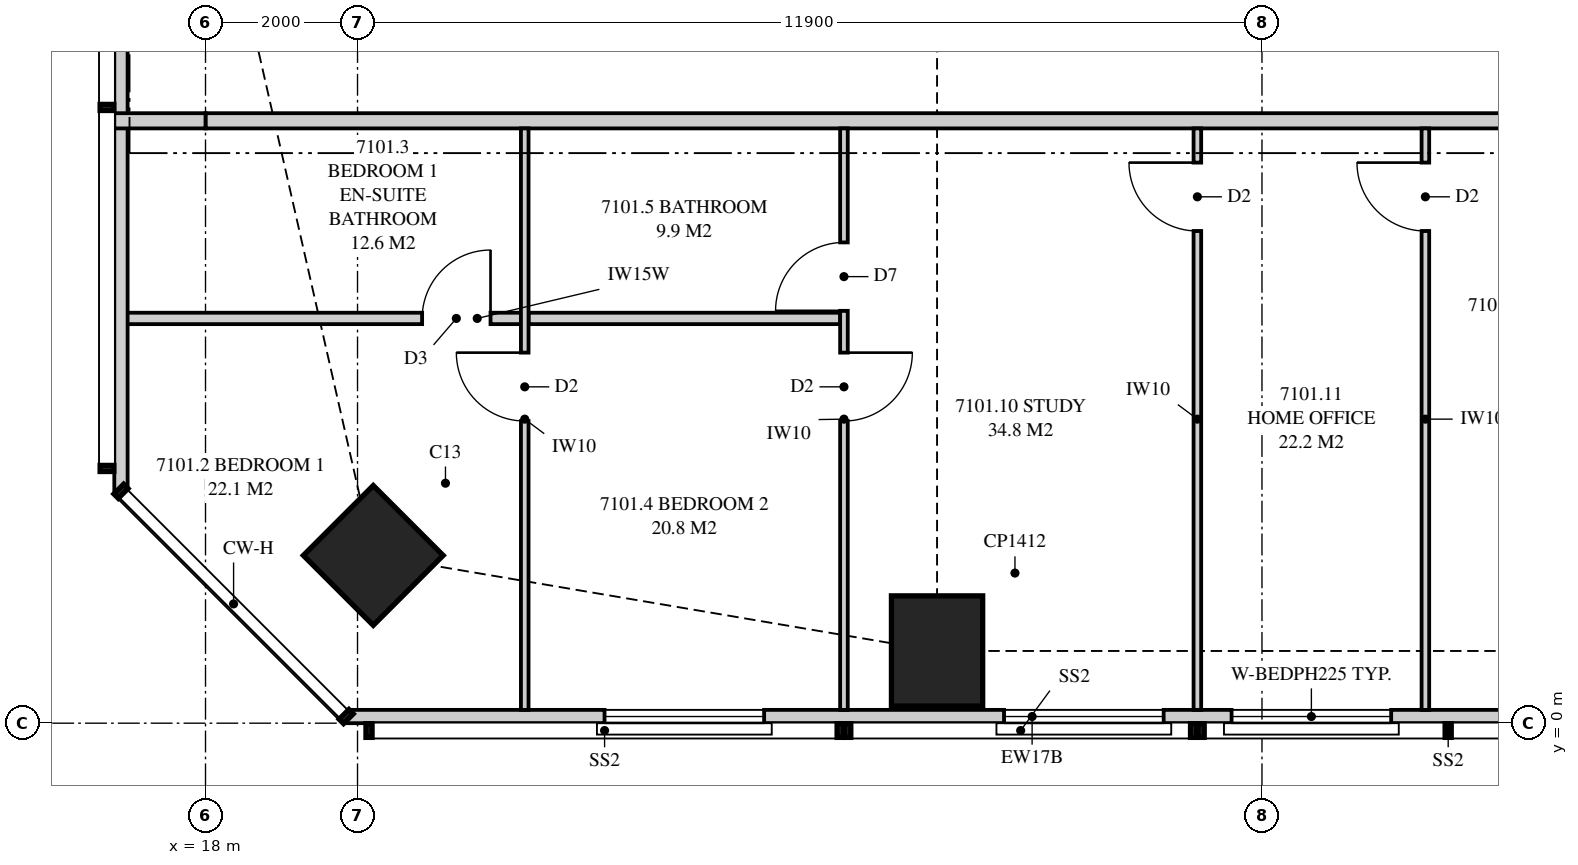
"""IFC4 building model, lengths in metres.
Left out: names, types, materials, properties, quantities, classifications, styles, units other than length and angle.
Written with IfcOpenShell. Run it as: python <this file> out.ifc"""

import sys

from ifc_helpers import new_model, si_unit, direction, frame, frame_2d, origin, origin_2d, place, context, subcontext, project, spatial, polyline, rectangle, outline, extrude, element, fill, save


model = new_model("IFC4")
c1 = context("Model", 3, precision=1e-05, world=origin(), true_north=direction((0.0, 1.0)))
c2 = subcontext(c1, "Body", "Model", "MODEL_VIEW")
j1 = project(units=[si_unit("LENGTHUNIT", "METRE"), si_unit("PLANEANGLEUNIT", "RADIAN")], contexts=[c1])
p1 = place(None, origin())
s1 = spatial("IfcSite", under=j1, at=p1, CompositionType="ELEMENT")
p2 = place(p1, origin())
s2 = spatial("IfcBuilding", under=s1, at=p2, CompositionType="ELEMENT")
p3 = place(p2, frame((0.0, 0.0, 259.95)))
s3 = spatial("IfcBuildingStorey", under=s2, at=p3, CompositionType="ELEMENT", Elevation=259.95)
p4 = place(p3, frame((20.207, 2.207, 0.0), z_axis=(0.0, 0.0, 1.0), x_axis=(0.707106781187, 0.707106781187, 0.0)))
e1 = element("IfcColumn", 1, at=p4, inside=s3, PredefinedType="COLUMN", context=c2, shape_type="SweptSolid", body=[
    extrude(rectangle(XDim=1.3, YDim=1.3, at=origin_2d()), origin(), (0.0, 0.0, 1.0), 3.9),
])
p5 = place(p3, frame((27.625, 0.95, 0.0), z_axis=(0.0, 0.0, 1.0), x_axis=(0.0, 1.0, 0.0)))
e2 = element("IfcColumn", 2, at=p5, inside=s3, PredefinedType="COLUMN", context=c2, shape_type="SweptSolid", body=[
    extrude(rectangle(XDim=1.45, YDim=1.2, at=origin_2d()), origin(), (0.0, 0.0, 1.0), 3.9),
])
p6 = place(p3, frame((19.851, 0.087, 0.0), z_axis=(0.0, 0.0, 1.0), x_axis=(1.0, 0.0, 0.0)))
e3 = element("IfcWall", 3, at=p6, inside=s3, PredefinedType="SOLIDWALL", context=c2, shape_type="SweptSolid", body=[
    extrude(outline(polyline([(0.0, 0.0), (18.049, 0.0), (18.049, 2.7), (7.774, 2.7), (7.774, 3.66), (7.642, 3.66), (7.642, 2.7), (7.559, 2.7), (7.559, 3.66), (0.0, 3.66), (0.0, 0.0)])), frame((0.0, 0.087, 0.0), z_axis=(0.0, -1.0, 0.0), x_axis=(1.0, 0.0, 0.0)), (0.0, 0.0, 1.0), 0.175),
])
p7 = place(p6, frame((3.399, 0.0, 0.4)))
e4 = element("IfcOpeningElement", 4, at=p7, cuts=e3, PredefinedType="OPENING", context=c2, shape_type="SweptSolid", body=[
    extrude(rectangle(XDim=2.1, YDim=2.25, at=frame_2d((1.05, 1.125))), frame((0.0, 0.097, 0.0), z_axis=(0.0, -1.0, 0.0), x_axis=(1.0, 0.0, 0.0)), (0.0, 0.0, 1.0), 0.195),
])
p8 = place(p6, frame((8.655, 0.0, 0.4)))
e5 = element("IfcOpeningElement", 5, at=p8, cuts=e3, PredefinedType="OPENING", context=c2, shape_type="SweptSolid", body=[
    extrude(rectangle(XDim=2.1, YDim=2.25, at=frame_2d((1.05, 1.125))), frame((0.0, 0.097, 0.0), z_axis=(0.0, -1.0, 0.0), x_axis=(1.0, 0.0, 0.0)), (0.0, 0.0, 1.0), 0.195),
])
p9 = place(p6, frame((11.649, 0.0, 0.4)))
e6 = element("IfcOpeningElement", 6, at=p9, cuts=e3, PredefinedType="OPENING", context=c2, shape_type="SweptSolid", body=[
    extrude(rectangle(XDim=2.1, YDim=2.25, at=frame_2d((1.05, 1.125))), frame((0.0, 0.097, 0.0), z_axis=(0.0, -1.0, 0.0), x_axis=(1.0, 0.0, 0.0)), (0.0, 0.0, 1.0), 0.195),
])
p10 = place(p3, frame((16.887, 30.949, 0.0), z_axis=(0.0, 0.0, 1.0), x_axis=(0.0, -1.0, 0.0)))
e7 = element("IfcWall", 7, at=p10, inside=s3, PredefinedType="SOLIDWALL", context=c2, shape_type="SweptSolid", body=[
    extrude(outline(polyline([(0.0, 0.0), (27.897, 0.0), (27.897, 3.66), (18.148, 3.66), (18.148, 2.7), (18.125, 2.7), (18.125, 3.66), (17.949, 3.66), (17.949, 2.7), (5.949, 2.7), (5.949, 3.66), (0.0, 3.66), (0.0, 0.0)])), frame((0.0, 0.087, 0.0), z_axis=(0.0, -1.0, 0.0), x_axis=(1.0, 0.0, 0.0)), (0.0, 0.0, 1.0), 0.175),
])
p11 = place(p10, frame((11.849, 0.0, 0.4)))
e8 = element("IfcOpeningElement", 8, at=p11, cuts=e7, PredefinedType="OPENING", context=c2, shape_type="SweptSolid", body=[
    extrude(rectangle(XDim=1.2, YDim=2.0, at=frame_2d((0.6, 1.0))), frame((0.0, 0.097, 0.0), z_axis=(0.0, -1.0, 0.0), x_axis=(1.0, 0.0, 0.0)), (0.0, 0.0, 1.0), 0.195),
])
p12 = place(p3, frame((18.0, 7.925, 0.0), z_axis=(0.0, 0.0, 1.0), x_axis=(1.0, 0.0, 0.0)))
e9 = element("IfcWall", 9, at=p12, inside=s3, PredefinedType="PARTITIONING", context=c2, shape_type="SweptSolid", body=[
    extrude(outline(polyline([(0.0, 0.0), (27.875, 0.0), (27.875, 3.66), (27.875, 3.06), (27.565, 3.06), (27.565, 3.66), (20.56, 3.66), (20.56, 3.06), (17.94, 3.06), (17.94, 3.66), (10.935, 3.66), (10.935, 3.06), (8.315, 3.06), (8.315, 3.66), (1.839, 3.66), (1.839, 2.7), (0.0, 2.7), (0.0, 3.66), (0.0, 0.0)])), frame((0.0, 0.1, 0.0), z_axis=(0.0, -1.0, 0.0), x_axis=(1.0, 0.0, 0.0)), (0.0, 0.0, 1.0), 0.2),
])
p13 = place(p12, frame((18.75, 0.0, 0.0)))
e10 = element("IfcOpeningElement", 10, at=p13, cuts=e9, PredefinedType="OPENING", context=c2, shape_type="SweptSolid", body=[
    extrude(rectangle(XDim=1.05, YDim=2.2, at=frame_2d((0.525, 1.1))), frame((0.0, 0.11, 0.0), z_axis=(0.0, -1.0, 0.0), x_axis=(1.0, 0.0, 0.0)), (0.0, 0.0, 1.0), 0.22),
])
p14 = place(p3, frame((22.2, 0.175, 0.0), z_axis=(0.0, 0.0, 1.0), x_axis=(0.0, 1.0, 0.0)))
e11 = element("IfcWall", 11, at=p14, inside=s3, PredefinedType="PARTITIONING", context=c2, shape_type="SweptSolid", body=[
    extrude(outline(polyline([(0.0, 0.0), (7.65, 0.0), (7.65, 3.66), (2.567, 3.66), (2.567, 2.7), (0.822, 2.7), (0.822, 3.66), (0.0, 3.66), (0.0, 0.0)])), frame((0.0, 0.05, 0.0), z_axis=(0.0, -1.0, 0.0), x_axis=(1.0, 0.0, 0.0)), (0.0, 0.0, 1.0), 0.1),
])
p15 = place(p14, frame((3.8, 0.0, 0.0)))
e12 = element("IfcOpeningElement", 12, at=p15, cuts=e11, PredefinedType="OPENING", context=c2, shape_type="SweptSolid", body=[
    extrude(rectangle(XDim=0.9, YDim=2.1, at=frame_2d((0.45, 1.05))), frame((0.0, 0.06, 0.0), z_axis=(0.0, -1.0, 0.0), x_axis=(1.0, 0.0, 0.0)), (0.0, 0.0, 1.0), 0.12),
])
p16 = place(p3, frame((26.4, 0.175, 0.0), z_axis=(0.0, 0.0, 1.0), x_axis=(0.0, 1.0, 0.0)))
e13 = element("IfcWall", 13, at=p16, inside=s3, PredefinedType="PARTITIONING", context=c2, shape_type="SweptSolid", body=[
    extrude(outline(polyline([(0.0, 0.0), (7.65, 0.0), (7.65, 3.66), (7.65, 3.06), (1.855, 3.06), (1.855, 2.7), (0.11, 2.7), (0.11, 3.66), (0.0, 3.66), (0.0, 0.0)])), frame((0.0, 0.05, 0.0), z_axis=(0.0, -1.0, 0.0), x_axis=(1.0, 0.0, 0.0)), (0.0, 0.0, 1.0), 0.1),
])
p17 = place(p16, frame((3.8, 0.0, 0.0)))
e14 = element("IfcOpeningElement", 14, at=p17, cuts=e13, PredefinedType="OPENING", context=c2, shape_type="SweptSolid", body=[
    extrude(rectangle(XDim=0.9, YDim=2.1, at=frame_2d((0.45, 1.05))), frame((0.0, 0.06, 0.0), z_axis=(0.0, -1.0, 0.0), x_axis=(1.0, 0.0, 0.0)), (0.0, 0.0, 1.0), 0.12),
])
p18 = place(p16, frame((5.25, 0.0, 0.0)))
e15 = element("IfcOpeningElement", 15, at=p18, cuts=e13, PredefinedType="OPENING", context=c2, shape_type="SweptSolid", body=[
    extrude(rectangle(XDim=0.9, YDim=2.1, at=frame_2d((0.45, 1.05))), frame((0.0, 0.06, 0.0), z_axis=(0.0, -1.0, 0.0), x_axis=(1.0, 0.0, 0.0)), (0.0, 0.0, 1.0), 0.12),
])
p19 = place(p3, frame((16.8, 5.325, 0.0), z_axis=(0.0, 0.0, 1.0), x_axis=(1.0, 0.0, 0.0)))
e16 = element("IfcWall", 16, at=p19, inside=s3, PredefinedType="PLUMBINGWALL", context=c2, shape_type="SweptSolid", body=[
    extrude(outline(polyline([(0.0, 0.0), (5.35, 0.0), (5.35, 3.66), (3.605, 3.66), (3.605, 2.7), (1.79, 2.7), (1.79, 3.66), (0.0, 3.66), (0.0, 0.0)])), frame((0.0, 0.075, 0.0), z_axis=(0.0, -1.0, 0.0), x_axis=(1.0, 0.0, 0.0)), (0.0, 0.0, 1.0), 0.15),
])
p20 = place(p19, frame((4.05, 0.0, 0.0)))
e17 = element("IfcOpeningElement", 17, at=p20, cuts=e16, PredefinedType="OPENING", context=c2, shape_type="SweptSolid", body=[
    extrude(rectangle(XDim=0.9, YDim=2.1, at=frame_2d((0.45, 1.05))), frame((0.0, 0.085, 0.0), z_axis=(0.0, -1.0, 0.0), x_axis=(1.0, 0.0, 0.0)), (0.0, 0.0, 1.0), 0.17),
])
p21 = place(p3, frame((22.25, 5.325, 0.0), z_axis=(0.0, 0.0, 1.0), x_axis=(1.0, 0.0, 0.0)))
e18 = element("IfcWall", 18, at=p21, inside=s3, PredefinedType="PLUMBINGWALL", context=c2, shape_type="SweptSolid", body=[
    extrude(outline(polyline([(0.0, 0.0), (4.1, 0.0), (4.1, 3.66), (4.1, 3.06), (4.09, 3.06), (4.09, 3.66), (0.0, 3.66), (0.0, 0.0)])), frame((0.0, 0.075, 0.0), z_axis=(0.0, -1.0, 0.0), x_axis=(1.0, 0.0, 0.0)), (0.0, 0.0, 1.0), 0.15),
])
p22 = place(p3, frame((31.05, 0.175, 0.0), z_axis=(0.0, 0.0, 1.0), x_axis=(0.0, 1.0, 0.0)))
e19 = element("IfcWall", 19, at=p22, inside=s3, PredefinedType="PARTITIONING", context=c2, shape_type="SweptSolid", body=[
    extrude(outline(polyline([(0.0, 0.0), (7.65, 0.0), (7.65, 3.66), (1.635, 3.66), (1.635, 2.7), (0.0, 2.7), (0.0, 3.66), (0.0, 0.0)])), frame((0.0, 0.05, 0.0), z_axis=(0.0, -1.0, 0.0), x_axis=(1.0, 0.0, 0.0)), (0.0, 0.0, 1.0), 0.1),
])
p23 = place(p22, frame((6.3, 0.0, 0.0)))
e20 = element("IfcOpeningElement", 20, at=p23, cuts=e19, PredefinedType="OPENING", context=c2, shape_type="SweptSolid", body=[
    extrude(rectangle(XDim=0.9, YDim=2.1, at=frame_2d((0.45, 1.05))), frame((0.0, 0.06, 0.0), z_axis=(0.0, -1.0, 0.0), x_axis=(1.0, 0.0, 0.0)), (0.0, 0.0, 1.0), 0.12),
])
p24 = place(p3, frame((34.05, 0.175, 0.0), z_axis=(0.0, 0.0, 1.0), x_axis=(0.0, 1.0, 0.0)))
e21 = element("IfcWall", 21, at=p24, inside=s3, PredefinedType="PARTITIONING", context=c2, shape_type="SweptSolid", body=[
    extrude(outline(polyline([(0.0, 0.0), (7.65, 0.0), (7.65, 3.66), (1.635, 3.66), (1.635, 2.7), (0.0, 2.7), (0.0, 3.66), (0.0, 0.0)])), frame((0.0, 0.05, 0.0), z_axis=(0.0, -1.0, 0.0), x_axis=(1.0, 0.0, 0.0)), (0.0, 0.0, 1.0), 0.1),
])
p25 = place(p24, frame((6.3, 0.0, 0.0)))
e22 = element("IfcOpeningElement", 22, at=p25, cuts=e21, PredefinedType="OPENING", context=c2, shape_type="SweptSolid", body=[
    extrude(rectangle(XDim=0.9, YDim=2.1, at=frame_2d((0.45, 1.05))), frame((0.0, 0.06, 0.0), z_axis=(0.0, -1.0, 0.0), x_axis=(1.0, 0.0, 0.0)), (0.0, 0.0, 1.0), 0.12),
])
p26 = place(p3, frame((16.8, 7.925, 0.0), z_axis=(0.0, 0.0, 1.0), x_axis=(1.0, 0.0, 0.0)))
e23 = element("IfcWall", 23, at=p26, inside=s3, PredefinedType="PARTITIONING", context=c2, shape_type="SweptSolid", body=[
    extrude(outline(polyline([(0.0, 0.0), (1.2, 0.0), (1.2, 3.66), (1.2, 2.7), (1.172, 2.7), (1.172, 3.66), (0.0, 3.66), (0.0, 0.0)])), frame((0.0, 0.1, 0.0), z_axis=(0.0, -1.0, 0.0), x_axis=(1.0, 0.0, 0.0)), (0.0, 0.0, 1.0), 0.2),
])
p27 = place(p7, origin())
e24 = element("IfcWindow", 24, at=p27, inside=s3, PartitioningType="SINGLE_PANEL", PredefinedType="WINDOW", context=c2, shape_type="SweptSolid", body=[
    extrude(rectangle(XDim=2.1, YDim=2.25, at=frame_2d((1.05, 1.125))), frame((0.0, 0.03, 0.0), z_axis=(0.0, -1.0, 0.0), x_axis=(1.0, 0.0, 0.0)), (0.0, 0.0, 1.0), 0.06),
])
fill(e4, e24)
p28 = place(p8, origin())
e25 = element("IfcWindow", 25, at=p28, inside=s3, PartitioningType="SINGLE_PANEL", PredefinedType="WINDOW", context=c2, shape_type="SweptSolid", body=[
    extrude(rectangle(XDim=2.1, YDim=2.25, at=frame_2d((1.05, 1.125))), frame((0.0, 0.03, 0.0), z_axis=(0.0, -1.0, 0.0), x_axis=(1.0, 0.0, 0.0)), (0.0, 0.0, 1.0), 0.06),
])
fill(e5, e25)
p29 = place(p9, origin())
e26 = element("IfcWindow", 26, at=p29, inside=s3, PartitioningType="SINGLE_PANEL", PredefinedType="WINDOW", context=c2, shape_type="SweptSolid", body=[
    extrude(rectangle(XDim=2.1, YDim=2.25, at=frame_2d((1.05, 1.125))), frame((0.0, 0.03, 0.0), z_axis=(0.0, -1.0, 0.0), x_axis=(1.0, 0.0, 0.0)), (0.0, 0.0, 1.0), 0.06),
])
fill(e6, e26)
p30 = place(p15, origin())
e27 = element("IfcDoor", 27, at=p30, inside=s3, OperationType="SINGLE_SWING_RIGHT", PredefinedType="DOOR", context=c2, shape_type="SweptSolid", body=[
    extrude(rectangle(XDim=0.9, YDim=2.1, at=frame_2d((0.45, 1.05))), frame((0.0, 0.025, 0.0), z_axis=(0.0, -1.0, 0.0), x_axis=(1.0, 0.0, 0.0)), (0.0, 0.0, 1.0), 0.05),
])
fill(e12, e27)
p31 = place(p20, origin())
e28 = element("IfcDoor", 28, at=p31, inside=s3, OperationType="SINGLE_SWING_RIGHT", PredefinedType="DOOR", context=c2, shape_type="SweptSolid", body=[
    extrude(rectangle(XDim=0.9, YDim=2.1, at=frame_2d((0.45, 1.05))), frame((0.0, 0.025, 0.0), z_axis=(0.0, -1.0, 0.0), x_axis=(1.0, 0.0, 0.0)), (0.0, 0.0, 1.0), 0.05),
])
fill(e17, e28)
p32 = place(p17, frame((0.9, 0.0, 0.0), z_axis=(0.0, 0.0, 1.0), x_axis=(-1.0, 0.0, 0.0)))
e29 = element("IfcDoor", 29, at=p32, inside=s3, OperationType="SINGLE_SWING_LEFT", PredefinedType="DOOR", context=c2, shape_type="SweptSolid", body=[
    extrude(rectangle(XDim=0.9, YDim=2.1, at=frame_2d((0.45, 1.05))), frame((0.0, 0.025, 0.0), z_axis=(0.0, -1.0, 0.0), x_axis=(1.0, 0.0, 0.0)), (0.0, 0.0, 1.0), 0.05),
])
fill(e14, e29)
p33 = place(p18, origin())
e30 = element("IfcDoor", 30, at=p33, inside=s3, OperationType="SINGLE_SWING_LEFT", PredefinedType="DOOR", context=c2, shape_type="SweptSolid", body=[
    extrude(rectangle(XDim=0.9, YDim=2.1, at=frame_2d((0.45, 1.05))), frame((0.0, 0.025, 0.0), z_axis=(0.0, -1.0, 0.0), x_axis=(1.0, 0.0, 0.0)), (0.0, 0.0, 1.0), 0.05),
])
fill(e15, e30)
p34 = place(p23, origin())
e31 = element("IfcDoor", 31, at=p34, inside=s3, OperationType="SINGLE_SWING_RIGHT", PredefinedType="DOOR", context=c2, shape_type="SweptSolid", body=[
    extrude(rectangle(XDim=0.9, YDim=2.1, at=frame_2d((0.45, 1.05))), frame((0.0, 0.025, 0.0), z_axis=(0.0, -1.0, 0.0), x_axis=(1.0, 0.0, 0.0)), (0.0, 0.0, 1.0), 0.05),
])
fill(e20, e31)
p35 = place(p25, origin())
e32 = element("IfcDoor", 32, at=p35, inside=s3, OperationType="SINGLE_SWING_RIGHT", PredefinedType="DOOR", context=c2, shape_type="SweptSolid", body=[
    extrude(rectangle(XDim=0.9, YDim=2.1, at=frame_2d((0.45, 1.05))), frame((0.0, 0.025, 0.0), z_axis=(0.0, -1.0, 0.0), x_axis=(1.0, 0.0, 0.0)), (0.0, 0.0, 1.0), 0.05),
])
fill(e22, e32)
save(model, sys.argv[1])
